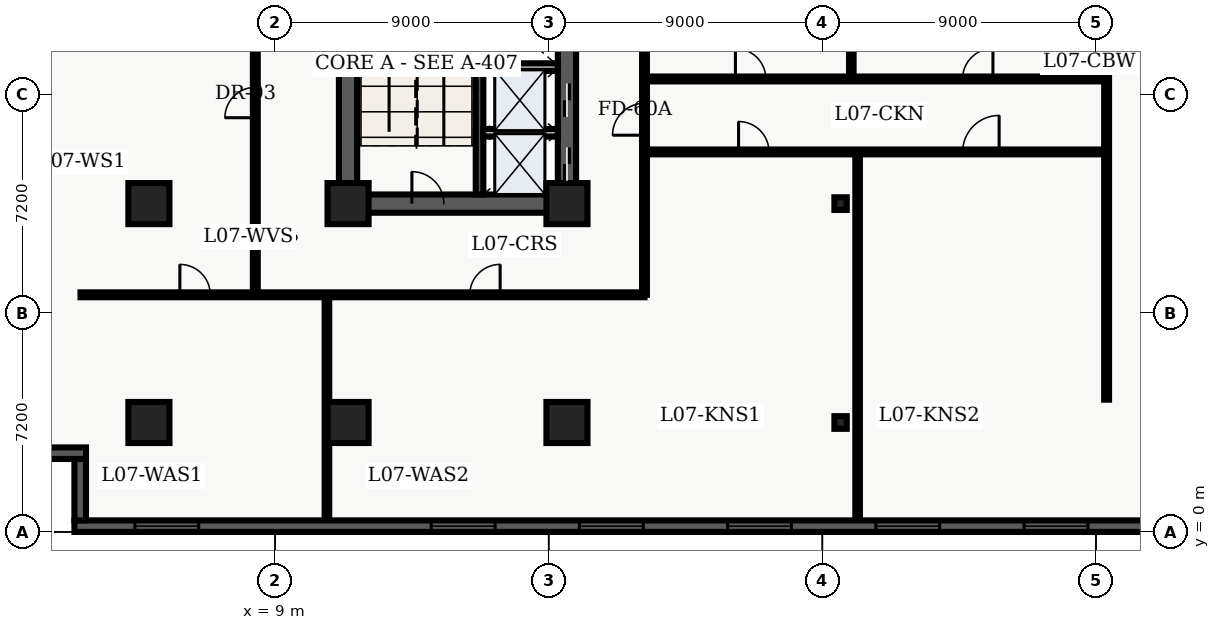
"""IFC4 building model, lengths in metres.
Left out: names, types, materials, properties, quantities, classifications, styles, units other than length and angle.
Written with IfcOpenShell. Run it as: python <this file> out.ifc"""

import sys

from ifc_helpers import new_model, entity, si_unit, converted_unit, direction, frame, origin_with_axes, origin_2d_with_axis, place, context, subcontext, project, spatial, polyline, rectangle, i_section, outline, extrude, element, fill, save


model = new_model("IFC4")
c1 = context("Model", 3, precision=1e-05, world=origin_with_axes(), true_north=direction((0.0, 1.0)))
c2 = subcontext(c1, "Body", "Model", "MODEL_VIEW")
j1 = project(units=[si_unit("LENGTHUNIT", "METRE"), converted_unit("PLANEANGLEUNIT", "DEGREE", entity("IfcPlaneAngleMeasure", 0.017), si_unit("PLANEANGLEUNIT", "RADIAN"), dimensions=[0, 0, 0, 0, 0, 0, 0])], contexts=[c1])
p1 = place(None, origin_with_axes())
s1 = spatial("IfcSite", under=j1, at=p1, CompositionType="ELEMENT")
p2 = place(p1, origin_with_axes())
s2 = spatial("IfcBuilding", under=s1, at=p2, CompositionType="ELEMENT")
p3 = place(p2, frame((0.0, 0.0, 32.7), z_axis=(0.0, 0.0, 1.0), x_axis=(1.0, 0.0, 0.0)))
s3 = spatial("IfcBuildingStorey", under=s2, at=p3, CompositionType="ELEMENT", Elevation=32.7)
p4 = place(p3, frame((11.4, 10.8, 0.0), z_axis=(0.0, 0.0, 1.0), x_axis=(0.0, 1.0, 0.0)))
e1 = element("IfcWall", 1, at=p4, inside=s3, PredefinedType="SHEAR", context=c2, shape_type="SweptSolid", body=[
    extrude(outline(polyline([(0.0, -0.3), (27.0, -0.3), (27.0, 0.3), (0.0, 0.3), (0.0, -0.3)])), origin_with_axes(), (0.0, 0.0, 1.0), 3.66),
])
p5 = place(p3, frame((11.4, 10.8, 0.0), z_axis=(0.0, 0.0, 1.0), x_axis=(1.0, 0.0, 0.0)))
e2 = element("IfcWall", 2, at=p5, inside=s3, PredefinedType="SHEAR", context=c2, shape_type="SweptSolid", body=[
    extrude(outline(polyline([(0.0, -0.3), (7.2, -0.3), (7.2, 0.3), (0.0, 0.3), (0.0, -0.3)])), origin_with_axes(), (0.0, 0.0, 1.0), 3.66),
])
p6 = place(p5, frame((2.625, 0.0, 0.0), z_axis=(0.0, 0.0, 1.0), x_axis=(1.0, 0.0, 0.0)))
e3 = element("IfcOpeningElement", 3, at=p6, cuts=e2, PredefinedType="OPENING", context=c2, shape_type="SweptSolid", body=[
    extrude(rectangle(XDim=1.05, YDim=0.62, at=origin_2d_with_axis()), origin_with_axes(), (0.0, 0.0, 1.0), 2.15),
])
p7 = place(p3, frame((18.6, 10.8, 0.0), z_axis=(0.0, 0.0, 1.0), x_axis=(0.0, 1.0, 0.0)))
e4 = element("IfcWall", 4, at=p7, inside=s3, PredefinedType="SHEAR", context=c2, shape_type="SweptSolid", body=[
    extrude(outline(polyline([(0.0, -0.3), (13.5, -0.3), (13.5, 0.3), (0.0, 0.3), (0.0, -0.3)])), origin_with_axes(), (0.0, 0.0, 1.0), 3.66),
])
p8 = place(p7, frame((1.3, 0.0, 0.0), z_axis=(0.0, 0.0, 1.0), x_axis=(1.0, 0.0, 0.0)))
e5 = element("IfcOpeningElement", 5, at=p8, cuts=e4, PredefinedType="OPENING", context=c2, shape_type="SweptSolid", body=[
    extrude(rectangle(XDim=1.1, YDim=0.62, at=origin_2d_with_axis()), origin_with_axes(), (0.0, 0.0, 1.0), 2.15),
])
p9 = place(p7, frame((3.4, 0.0, 0.0), z_axis=(0.0, 0.0, 1.0), x_axis=(1.0, 0.0, 0.0)))
e6 = element("IfcOpeningElement", 6, at=p9, cuts=e4, PredefinedType="OPENING", context=c2, shape_type="SweptSolid", body=[
    extrude(rectangle(XDim=1.1, YDim=0.62, at=origin_2d_with_axis()), origin_with_axes(), (0.0, 0.0, 1.0), 2.15),
])
p10 = place(p7, frame((11.125, 0.0, 0.0), z_axis=(0.0, 0.0, 1.0), x_axis=(1.0, 0.0, 0.0)))
e7 = element("IfcOpeningElement", 7, at=p10, cuts=e4, PredefinedType="OPENING", context=c2, shape_type="SweptSolid", body=[
    extrude(rectangle(XDim=1.05, YDim=0.62, at=origin_2d_with_axis()), origin_with_axes(), (0.0, 0.0, 1.0), 2.15),
])
p11 = place(p3, frame((15.725, 11.1, 0.0), z_axis=(0.0, 0.0, 1.0), x_axis=(0.0, 1.0, 0.0)))
e8 = element("IfcWall", 8, at=p11, inside=s3, PredefinedType="SHEAR", context=c2, shape_type="SweptSolid", body=[
    extrude(outline(polyline([(0.0, -0.125), (8.6, -0.125), (8.6, 0.125), (0.0, 0.125), (0.0, -0.125)])), origin_with_axes(), (0.0, 0.0, 1.0), 3.66),
])
for number, where, z_axis, x_axis in (
    (9, (11.4, 3.6, 0.0), (0.0, 0.0, 1.0), (1.0, 0.0, 0.0)),
    (10, (11.4, 10.8, 0.0), (0.0, 0.0, 1.0), (1.0, 0.0, 0.0)),
    (11, (18.6, 3.6, 0.0), (0.0, 0.0, 1.0), (1.0, 0.0, 0.0)),
    (12, (18.6, 10.8, 0.0), (0.0, 0.0, 1.0), (1.0, 0.0, 0.0)),
    (13, (4.85, 3.6, 0.0), (0.0, 0.0, 1.0), (1.0, 0.0, 0.0)),
    (14, (4.85, 10.8, 0.0), (0.0, 0.0, 1.0), (1.0, 0.0, 0.0)),
):
    element("IfcColumn", number, at=place(p3, frame(where, z_axis=z_axis, x_axis=x_axis)), inside=s3, PredefinedType="COLUMN", context=c2, shape_type="SweptSolid", body=[
        extrude(rectangle(XDim=1.35, YDim=1.35, at=origin_2d_with_axis()), origin_with_axes(), (0.0, 0.0, 1.0), 3.9),
    ])
for number, where, z_axis, x_axis in (
    (15, (27.6, 3.6, 0.0), (0.0, 0.0, 1.0), (1.0, 0.0, 0.0)),
    (16, (27.6, 10.8, 0.0), (0.0, 0.0, 1.0), (1.0, 0.0, 0.0)),
):
    element("IfcColumn", number, at=place(p3, frame(where, z_axis=z_axis, x_axis=x_axis)), inside=s3, PredefinedType="COLUMN", context=c2, shape_type="SweptSolid", body=[
        extrude(i_section(OverallWidth=0.406, OverallDepth=0.416, WebThickness=0.03, FlangeThickness=0.048, FilletRadius=0.022, at=origin_2d_with_axis()), origin_with_axes(), (0.0, 0.0, 1.0), 3.9),
    ])
for number, where, z_axis, x_axis in (
    (17, (15.84, 13.13, 0.0), (0.0, 0.0, 1.0), (1.0, 0.0, 0.0)),
    (18, (15.84, 15.29, 0.0), (0.0, 0.0, 1.0), (1.0, 0.0, 0.0)),
):
    element("IfcWall", number, at=place(p3, frame(where, z_axis=z_axis, x_axis=x_axis)), inside=s3, PredefinedType="SOLIDWALL", context=c2, shape_type="SweptSolid", body=[
        extrude(outline(polyline([(0.0, -0.125), (2.46, -0.125), (2.46, 0.125), (0.0, 0.125), (0.0, -0.125)])), origin_with_axes(), (0.0, 0.0, 1.0), 2.7),
    ])
p12 = place(p3, frame((2.6, 7.8, 0.0), z_axis=(0.0, 0.0, 1.0), x_axis=(1.0, 0.0, 0.0)))
e19 = element("IfcWall", 19, at=p12, inside=s3, PredefinedType="PARTITIONING", context=c2, shape_type="SweptSolid", body=[
    extrude(outline(polyline([(0.0, -0.08), (18.55, -0.08), (18.55, 0.08), (0.0, 0.08), (0.0, -0.08)])), origin_with_axes(), (0.0, 0.0, 1.0), 2.7),
])
p13 = place(p12, frame((3.768, 0.0, 0.0), z_axis=(0.0, 0.0, 1.0), x_axis=(1.0, 0.0, 0.0)))
e20 = element("IfcOpeningElement", 20, at=p13, cuts=e19, PredefinedType="OPENING", context=c2, shape_type="SweptSolid", body=[
    extrude(rectangle(XDim=1.0, YDim=0.18, at=origin_2d_with_axis()), origin_with_axes(), (0.0, 0.0, 1.0), 2.15),
])
p14 = place(p12, frame((13.303, 0.0, 0.0), z_axis=(0.0, 0.0, 1.0), x_axis=(1.0, 0.0, 0.0)))
e21 = element("IfcOpeningElement", 21, at=p14, cuts=e19, PredefinedType="OPENING", context=c2, shape_type="SweptSolid", body=[
    extrude(rectangle(XDim=1.0, YDim=0.18, at=origin_2d_with_axis()), origin_with_axes(), (0.0, 0.0, 1.0), 2.15),
])
p15 = place(p3, frame((21.15, 7.8, 0.0), z_axis=(0.0, 0.0, 1.0), x_axis=(0.0, 1.0, 0.0)))
e22 = element("IfcWall", 22, at=p15, inside=s3, PredefinedType="PARTITIONING", context=c2, shape_type="SweptSolid", body=[
    extrude(outline(polyline([(0.0, -0.08), (32.7, -0.08), (32.7, 0.08), (0.0, 0.08), (0.0, -0.08)])), origin_with_axes(), (0.0, 0.0, 1.0), 2.7),
])
p16 = place(p15, frame((5.775, 0.0, 0.0), z_axis=(0.0, 0.0, 1.0), x_axis=(1.0, 0.0, 0.0)))
e23 = element("IfcOpeningElement", 23, at=p16, cuts=e22, PredefinedType="OPENING", context=c2, shape_type="SweptSolid", body=[
    extrude(rectangle(XDim=1.05, YDim=0.18, at=origin_2d_with_axis()), origin_with_axes(), (0.0, 0.0, 1.0), 2.15),
])
p17 = place(p3, frame((8.35, 7.8, 0.0), z_axis=(0.0, 0.0, 1.0), x_axis=(0.0, 1.0, 0.0)))
e24 = element("IfcWall", 24, at=p17, inside=s3, PredefinedType="PARTITIONING", context=c2, shape_type="SweptSolid", body=[
    extrude(outline(polyline([(0.0, -0.08), (12.6, -0.08), (12.6, 0.08), (0.0, 0.08), (0.0, -0.08)])), origin_with_axes(), (0.0, 0.0, 1.0), 2.7),
])
p18 = place(p17, frame((6.325, 0.0, 0.0), z_axis=(0.0, 0.0, 1.0), x_axis=(1.0, 0.0, 0.0)))
e25 = element("IfcOpeningElement", 25, at=p18, cuts=e24, PredefinedType="OPENING", context=c2, shape_type="SweptSolid", body=[
    extrude(rectangle(XDim=1.0, YDim=0.18, at=origin_2d_with_axis()), origin_with_axes(), (0.0, 0.0, 1.0), 2.15),
])
p19 = place(p3, frame((10.705, 0.36, 0.0), z_axis=(0.0, 0.0, 1.0), x_axis=(0.0, 1.0, 0.0)))
e26 = element("IfcWall", 26, at=p19, inside=s3, PredefinedType="PARTITIONING", context=c2, shape_type="SweptSolid", body=[
    extrude(outline(polyline([(0.0, -0.075), (7.34, -0.075), (7.34, 0.075), (0.0, 0.075), (0.0, -0.075)])), origin_with_axes(), (0.0, 0.0, 1.0), 2.7),
])
p20 = place(p3, frame((21.15, 12.5, 0.0), z_axis=(0.0, 0.0, 1.0), x_axis=(1.0, 0.0, 0.0)))
e27 = element("IfcWall", 27, at=p20, inside=s3, PredefinedType="PARTITIONING", context=c2, shape_type="SweptSolid", body=[
    extrude(outline(polyline([(0.0, -0.08), (15.2, -0.08), (15.2, 0.08), (0.0, 0.08), (0.0, -0.08)])), origin_with_axes(), (0.0, 0.0, 1.0), 2.7),
])
p21 = place(p20, frame((3.595, 0.0, 0.0), z_axis=(0.0, 0.0, 1.0), x_axis=(1.0, 0.0, 0.0)))
e28 = element("IfcOpeningElement", 28, at=p21, cuts=e27, PredefinedType="OPENING", context=c2, shape_type="SweptSolid", body=[
    extrude(rectangle(XDim=1.0, YDim=0.18, at=origin_2d_with_axis()), origin_with_axes(), (0.0, 0.0, 1.0), 2.15),
])
p22 = place(p20, frame((11.065, 0.0, 0.0), z_axis=(0.0, 0.0, 1.0), x_axis=(1.0, 0.0, 0.0)))
e29 = element("IfcOpeningElement", 29, at=p22, cuts=e27, PredefinedType="OPENING", context=c2, shape_type="SweptSolid", body=[
    extrude(rectangle(XDim=1.2, YDim=0.18, at=origin_2d_with_axis()), origin_with_axes(), (0.0, 0.0, 1.0), 2.2),
])
p23 = place(p3, frame((21.15, 14.9, 0.0), z_axis=(0.0, 0.0, 1.0), x_axis=(1.0, 0.0, 0.0)))
e30 = element("IfcWall", 30, at=p23, inside=s3, PredefinedType="PARTITIONING", context=c2, shape_type="SweptSolid", body=[
    extrude(outline(polyline([(0.0, -0.08), (15.2, -0.08), (15.2, 0.08), (0.0, 0.08), (0.0, -0.08)])), origin_with_axes(), (0.0, 0.0, 1.0), 2.7),
])
p24 = place(p23, frame((3.491, 0.0, 0.0), z_axis=(0.0, 0.0, 1.0), x_axis=(1.0, 0.0, 0.0)))
e31 = element("IfcOpeningElement", 31, at=p24, cuts=e30, PredefinedType="OPENING", context=c2, shape_type="SweptSolid", body=[
    extrude(rectangle(XDim=1.0, YDim=0.18, at=origin_2d_with_axis()), origin_with_axes(), (0.0, 0.0, 1.0), 2.15),
])
p25 = place(p23, frame((10.961, 0.0, 0.0), z_axis=(0.0, 0.0, 1.0), x_axis=(1.0, 0.0, 0.0)))
e32 = element("IfcOpeningElement", 32, at=p25, cuts=e30, PredefinedType="OPENING", context=c2, shape_type="SweptSolid", body=[
    extrude(rectangle(XDim=1.0, YDim=0.18, at=origin_2d_with_axis()), origin_with_axes(), (0.0, 0.0, 1.0), 2.15),
])
p26 = place(p3, frame((36.35, 4.35, 0.0), z_axis=(0.0, 0.0, 1.0), x_axis=(0.0, 1.0, 0.0)))
e33 = element("IfcWall", 33, at=p26, inside=s3, PredefinedType="PARTITIONING", context=c2, shape_type="SweptSolid", body=[
    extrude(outline(polyline([(0.0, -0.08), (16.95, -0.08), (16.95, 0.08), (0.0, 0.08), (0.0, -0.08)])), origin_with_axes(), (0.0, 0.0, 1.0), 2.7),
])
p27 = place(p3, frame((28.16, 0.36, 0.0), z_axis=(0.0, 0.0, 1.0), x_axis=(0.0, 1.0, 0.0)))
e34 = element("IfcWall", 34, at=p27, inside=s3, PredefinedType="PARTITIONING", context=c2, shape_type="SweptSolid", body=[
    extrude(outline(polyline([(0.0, -0.075), (12.02, -0.075), (12.02, 0.075), (0.0, 0.075), (0.0, -0.075)])), origin_with_axes(), (0.0, 0.0, 1.0), 2.7),
])
p28 = place(p3, frame((27.953, 15.02, 0.0), z_axis=(0.0, 0.0, 1.0), x_axis=(0.0, 1.0, 0.0)))
e35 = element("IfcWall", 35, at=p28, inside=s3, PredefinedType="PARTITIONING", context=c2, shape_type="SweptSolid", body=[
    extrude(outline(polyline([(0.0, -0.075), (6.205, -0.075), (6.205, 0.075), (0.0, 0.075), (0.0, -0.075)])), origin_with_axes(), (0.0, 0.0, 1.0), 2.7),
])
p29 = place(p3, frame((57.22, 0.19, 0.0), z_axis=(0.0, 0.0, 1.0), x_axis=(-1.0, 0.0, 0.0)))
e36 = element("IfcWall", 36, at=p29, inside=s3, PredefinedType="SOLIDWALL", context=c2, shape_type="SweptSolid", body=[
    extrude(outline(polyline([(0.0, -0.19), (54.82, -0.19), (54.82, 0.19), (0.0, 0.19), (0.0, -0.19)])), origin_with_axes(), (0.0, 0.0, 1.0), 3.66),
])
p30 = place(p29, frame((3.037, 0.0, 0.45), z_axis=(0.0, 0.0, 1.0), x_axis=(1.0, 0.0, 0.0)))
e37 = element("IfcOpeningElement", 37, at=p30, cuts=e36, PredefinedType="OPENING", context=c2, shape_type="SweptSolid", body=[
    extrude(rectangle(XDim=2.1, YDim=0.4, at=origin_2d_with_axis()), origin_with_axes(), (0.0, 0.0, 1.0), 2.2),
])
p31 = place(p29, frame((7.912, 0.0, 0.45), z_axis=(0.0, 0.0, 1.0), x_axis=(1.0, 0.0, 0.0)))
e38 = element("IfcOpeningElement", 38, at=p31, cuts=e36, PredefinedType="OPENING", context=c2, shape_type="SweptSolid", body=[
    extrude(rectangle(XDim=2.1, YDim=0.4, at=origin_2d_with_axis()), origin_with_axes(), (0.0, 0.0, 1.0), 2.2),
])
p32 = place(p29, frame((12.786, 0.0, 0.45), z_axis=(0.0, 0.0, 1.0), x_axis=(1.0, 0.0, 0.0)))
e39 = element("IfcOpeningElement", 39, at=p32, cuts=e36, PredefinedType="OPENING", context=c2, shape_type="SweptSolid", body=[
    extrude(rectangle(XDim=2.1, YDim=0.4, at=origin_2d_with_axis()), origin_with_axes(), (0.0, 0.0, 1.0), 2.2),
])
p33 = place(p29, frame((17.661, 0.0, 0.45), z_axis=(0.0, 0.0, 1.0), x_axis=(1.0, 0.0, 0.0)))
e40 = element("IfcOpeningElement", 40, at=p33, cuts=e36, PredefinedType="OPENING", context=c2, shape_type="SweptSolid", body=[
    extrude(rectangle(XDim=2.1, YDim=0.4, at=origin_2d_with_axis()), origin_with_axes(), (0.0, 0.0, 1.0), 2.2),
])
p34 = place(p29, frame((22.535, 0.0, 0.45), z_axis=(0.0, 0.0, 1.0), x_axis=(1.0, 0.0, 0.0)))
e41 = element("IfcOpeningElement", 41, at=p34, cuts=e36, PredefinedType="OPENING", context=c2, shape_type="SweptSolid", body=[
    extrude(rectangle(XDim=2.1, YDim=0.4, at=origin_2d_with_axis()), origin_with_axes(), (0.0, 0.0, 1.0), 2.2),
])
p35 = place(p29, frame((27.41, 0.0, 0.45), z_axis=(0.0, 0.0, 1.0), x_axis=(1.0, 0.0, 0.0)))
e42 = element("IfcOpeningElement", 42, at=p35, cuts=e36, PredefinedType="OPENING", context=c2, shape_type="SweptSolid", body=[
    extrude(rectangle(XDim=2.1, YDim=0.4, at=origin_2d_with_axis()), origin_with_axes(), (0.0, 0.0, 1.0), 2.2),
])
p36 = place(p29, frame((32.285, 0.0, 0.45), z_axis=(0.0, 0.0, 1.0), x_axis=(1.0, 0.0, 0.0)))
e43 = element("IfcOpeningElement", 43, at=p36, cuts=e36, PredefinedType="OPENING", context=c2, shape_type="SweptSolid", body=[
    extrude(rectangle(XDim=2.1, YDim=0.4, at=origin_2d_with_axis()), origin_with_axes(), (0.0, 0.0, 1.0), 2.2),
])
p37 = place(p29, frame((37.159, 0.0, 0.45), z_axis=(0.0, 0.0, 1.0), x_axis=(1.0, 0.0, 0.0)))
e44 = element("IfcOpeningElement", 44, at=p37, cuts=e36, PredefinedType="OPENING", context=c2, shape_type="SweptSolid", body=[
    extrude(rectangle(XDim=2.1, YDim=0.4, at=origin_2d_with_axis()), origin_with_axes(), (0.0, 0.0, 1.0), 2.2),
])
p38 = place(p29, frame((42.034, 0.0, 0.45), z_axis=(0.0, 0.0, 1.0), x_axis=(1.0, 0.0, 0.0)))
e45 = element("IfcOpeningElement", 45, at=p38, cuts=e36, PredefinedType="OPENING", context=c2, shape_type="SweptSolid", body=[
    extrude(rectangle(XDim=2.1, YDim=0.4, at=origin_2d_with_axis()), origin_with_axes(), (0.0, 0.0, 1.0), 2.2),
])
p39 = place(p29, frame((51.783, 0.0, 0.45), z_axis=(0.0, 0.0, 1.0), x_axis=(1.0, 0.0, 0.0)))
e46 = element("IfcOpeningElement", 46, at=p39, cuts=e36, PredefinedType="OPENING", context=c2, shape_type="SweptSolid", body=[
    extrude(rectangle(XDim=2.1, YDim=0.4, at=origin_2d_with_axis()), origin_with_axes(), (0.0, 0.0, 1.0), 2.2),
])
p40 = place(p3, frame((2.59, 0.38, 0.0), z_axis=(0.0, 0.0, 1.0), x_axis=(0.0, 1.0, 0.0)))
e47 = element("IfcWall", 47, at=p40, inside=s3, PredefinedType="SOLIDWALL", context=c2, shape_type="SweptSolid", body=[
    extrude(outline(polyline([(0.0, -0.19), (2.02, -0.19), (2.02, 0.19), (0.0, 0.19), (0.0, -0.19)])), origin_with_axes(), (0.0, 0.0, 1.0), 3.66),
])
p41 = place(p3, frame((2.78, 2.59, 0.0), z_axis=(0.0, 0.0, 1.0), x_axis=(-1.0, 0.0, 0.0)))
e48 = element("IfcWall", 48, at=p41, inside=s3, PredefinedType="SOLIDWALL", context=c2, shape_type="SweptSolid", body=[
    extrude(outline(polyline([(0.0, -0.19), (2.78, -0.19), (2.78, 0.19), (0.0, 0.19), (0.0, -0.19)])), origin_with_axes(), (0.0, 0.0, 1.0), 3.66),
])
p42 = place(p7, frame((1.3, 0.0, 0.0), z_axis=(0.0, 0.0, 1.0), x_axis=(1.0, 0.0, 0.0)))
e49 = element("IfcDoor", 49, at=p42, inside=s3, OperationType="SLIDING_TO_LEFT", PredefinedType="DOOR", context=c2, shape_type="SweptSolid", body=[
    extrude(rectangle(XDim=1.1, YDim=0.09, at=origin_2d_with_axis()), origin_with_axes(), (0.0, 0.0, 1.0), 2.15),
])
fill(e5, e49)
p43 = place(p7, frame((3.4, 0.0, 0.0), z_axis=(0.0, 0.0, 1.0), x_axis=(1.0, 0.0, 0.0)))
e50 = element("IfcDoor", 50, at=p43, inside=s3, OperationType="SLIDING_TO_RIGHT", PredefinedType="DOOR", context=c2, shape_type="SweptSolid", body=[
    extrude(rectangle(XDim=1.1, YDim=0.09, at=origin_2d_with_axis()), origin_with_axes(), (0.0, 0.0, 1.0), 2.15),
])
fill(e6, e50)
p44 = place(p5, frame((2.625, 0.0, 0.0), z_axis=(0.0, 0.0, 1.0), x_axis=(1.0, 0.0, 0.0)))
e51 = element("IfcDoor", 51, at=p44, inside=s3, OperationType="SINGLE_SWING_LEFT", PredefinedType="DOOR", context=c2, shape_type="SweptSolid", body=[
    extrude(rectangle(XDim=1.05, YDim=0.09, at=origin_2d_with_axis()), origin_with_axes(), (0.0, 0.0, 1.0), 2.15),
])
fill(e3, e51)
p45 = place(p17, frame((6.325, 0.0, 0.0), z_axis=(0.0, 0.0, 1.0), x_axis=(1.0, 0.0, 0.0)))
e52 = element("IfcDoor", 52, at=p45, inside=s3, OperationType="SINGLE_SWING_LEFT", PredefinedType="DOOR", context=c2, shape_type="SweptSolid", body=[
    extrude(rectangle(XDim=1.0, YDim=0.09, at=origin_2d_with_axis()), origin_with_axes(), (0.0, 0.0, 1.0), 2.15),
])
fill(e25, e52)
p46 = place(p12, frame((3.768, 0.0, 0.0), z_axis=(0.0, 0.0, 1.0), x_axis=(1.0, 0.0, 0.0)))
e53 = element("IfcDoor", 53, at=p46, inside=s3, OperationType="SINGLE_SWING_LEFT", PredefinedType="DOOR", context=c2, shape_type="SweptSolid", body=[
    extrude(rectangle(XDim=1.0, YDim=0.09, at=origin_2d_with_axis()), origin_with_axes(), (0.0, 0.0, 1.0), 2.15),
])
fill(e20, e53)
p47 = place(p12, frame((13.303, 0.0, 0.0), z_axis=(0.0, 0.0, 1.0), x_axis=(1.0, 0.0, 0.0)))
e54 = element("IfcDoor", 54, at=p47, inside=s3, OperationType="SINGLE_SWING_RIGHT", PredefinedType="DOOR", context=c2, shape_type="SweptSolid", body=[
    extrude(rectangle(XDim=1.0, YDim=0.09, at=origin_2d_with_axis()), origin_with_axes(), (0.0, 0.0, 1.0), 2.15),
])
fill(e21, e54)
p48 = place(p15, frame((5.775, 0.0, 0.0), z_axis=(0.0, 0.0, 1.0), x_axis=(1.0, 0.0, 0.0)))
e55 = element("IfcDoor", 55, at=p48, inside=s3, OperationType="SINGLE_SWING_LEFT", PredefinedType="DOOR", context=c2, shape_type="SweptSolid", body=[
    extrude(rectangle(XDim=1.05, YDim=0.09, at=origin_2d_with_axis()), origin_with_axes(), (0.0, 0.0, 1.0), 2.15),
])
fill(e23, e55)
p49 = place(p20, frame((3.595, 0.0, 0.0), z_axis=(0.0, 0.0, 1.0), x_axis=(1.0, 0.0, 0.0)))
e56 = element("IfcDoor", 56, at=p49, inside=s3, OperationType="SINGLE_SWING_LEFT", PredefinedType="DOOR", context=c2, shape_type="SweptSolid", body=[
    extrude(rectangle(XDim=1.0, YDim=0.09, at=origin_2d_with_axis()), origin_with_axes(), (0.0, 0.0, 1.0), 2.15),
])
fill(e28, e56)
p50 = place(p20, frame((11.065, 0.0, 0.0), z_axis=(0.0, 0.0, 1.0), x_axis=(1.0, 0.0, 0.0)))
e57 = element("IfcDoor", 57, at=p50, inside=s3, OperationType="SINGLE_SWING_RIGHT", PredefinedType="DOOR", context=c2, shape_type="SweptSolid", body=[
    extrude(rectangle(XDim=1.2, YDim=0.09, at=origin_2d_with_axis()), origin_with_axes(), (0.0, 0.0, 1.0), 2.2),
])
fill(e29, e57)
p51 = place(p23, frame((3.491, 0.0, 0.0), z_axis=(0.0, 0.0, 1.0), x_axis=(1.0, 0.0, 0.0)))
e58 = element("IfcDoor", 58, at=p51, inside=s3, OperationType="SINGLE_SWING_LEFT", PredefinedType="DOOR", context=c2, shape_type="SweptSolid", body=[
    extrude(rectangle(XDim=1.0, YDim=0.09, at=origin_2d_with_axis()), origin_with_axes(), (0.0, 0.0, 1.0), 2.15),
])
fill(e31, e58)
p52 = place(p23, frame((10.961, 0.0, 0.0), z_axis=(0.0, 0.0, 1.0), x_axis=(1.0, 0.0, 0.0)))
e59 = element("IfcDoor", 59, at=p52, inside=s3, OperationType="SINGLE_SWING_RIGHT", PredefinedType="DOOR", context=c2, shape_type="SweptSolid", body=[
    extrude(rectangle(XDim=1.0, YDim=0.09, at=origin_2d_with_axis()), origin_with_axes(), (0.0, 0.0, 1.0), 2.15),
])
fill(e32, e59)
p53 = place(p29, frame((22.535, 0.0, 0.45), z_axis=(0.0, 0.0, 1.0), x_axis=(1.0, 0.0, 0.0)))
e60 = element("IfcWindow", 60, at=p53, inside=s3, PredefinedType="WINDOW", context=c2, shape_type="SweptSolid", body=[
    extrude(rectangle(XDim=2.1, YDim=0.09, at=origin_2d_with_axis()), origin_with_axes(), (0.0, 0.0, 1.0), 2.2),
])
fill(e41, e60)
p54 = place(p29, frame((27.41, 0.0, 0.45), z_axis=(0.0, 0.0, 1.0), x_axis=(1.0, 0.0, 0.0)))
e61 = element("IfcWindow", 61, at=p54, inside=s3, PredefinedType="WINDOW", context=c2, shape_type="SweptSolid", body=[
    extrude(rectangle(XDim=2.1, YDim=0.09, at=origin_2d_with_axis()), origin_with_axes(), (0.0, 0.0, 1.0), 2.2),
])
fill(e42, e61)
p55 = place(p29, frame((32.285, 0.0, 0.45), z_axis=(0.0, 0.0, 1.0), x_axis=(1.0, 0.0, 0.0)))
e62 = element("IfcWindow", 62, at=p55, inside=s3, PredefinedType="WINDOW", context=c2, shape_type="SweptSolid", body=[
    extrude(rectangle(XDim=2.1, YDim=0.09, at=origin_2d_with_axis()), origin_with_axes(), (0.0, 0.0, 1.0), 2.2),
])
fill(e43, e62)
p56 = place(p29, frame((37.159, 0.0, 0.45), z_axis=(0.0, 0.0, 1.0), x_axis=(1.0, 0.0, 0.0)))
e63 = element("IfcWindow", 63, at=p56, inside=s3, PredefinedType="WINDOW", context=c2, shape_type="SweptSolid", body=[
    extrude(rectangle(XDim=2.1, YDim=0.09, at=origin_2d_with_axis()), origin_with_axes(), (0.0, 0.0, 1.0), 2.2),
])
fill(e44, e63)
p57 = place(p29, frame((42.034, 0.0, 0.45), z_axis=(0.0, 0.0, 1.0), x_axis=(1.0, 0.0, 0.0)))
e64 = element("IfcWindow", 64, at=p57, inside=s3, PredefinedType="WINDOW", context=c2, shape_type="SweptSolid", body=[
    extrude(rectangle(XDim=2.1, YDim=0.09, at=origin_2d_with_axis()), origin_with_axes(), (0.0, 0.0, 1.0), 2.2),
])
fill(e45, e64)
p58 = place(p29, frame((51.783, 0.0, 0.45), z_axis=(0.0, 0.0, 1.0), x_axis=(1.0, 0.0, 0.0)))
e65 = element("IfcWindow", 65, at=p58, inside=s3, PredefinedType="WINDOW", context=c2, shape_type="SweptSolid", body=[
    extrude(rectangle(XDim=2.1, YDim=0.09, at=origin_2d_with_axis()), origin_with_axes(), (0.0, 0.0, 1.0), 2.2),
])
fill(e46, e65)
save(model, sys.argv[1])
